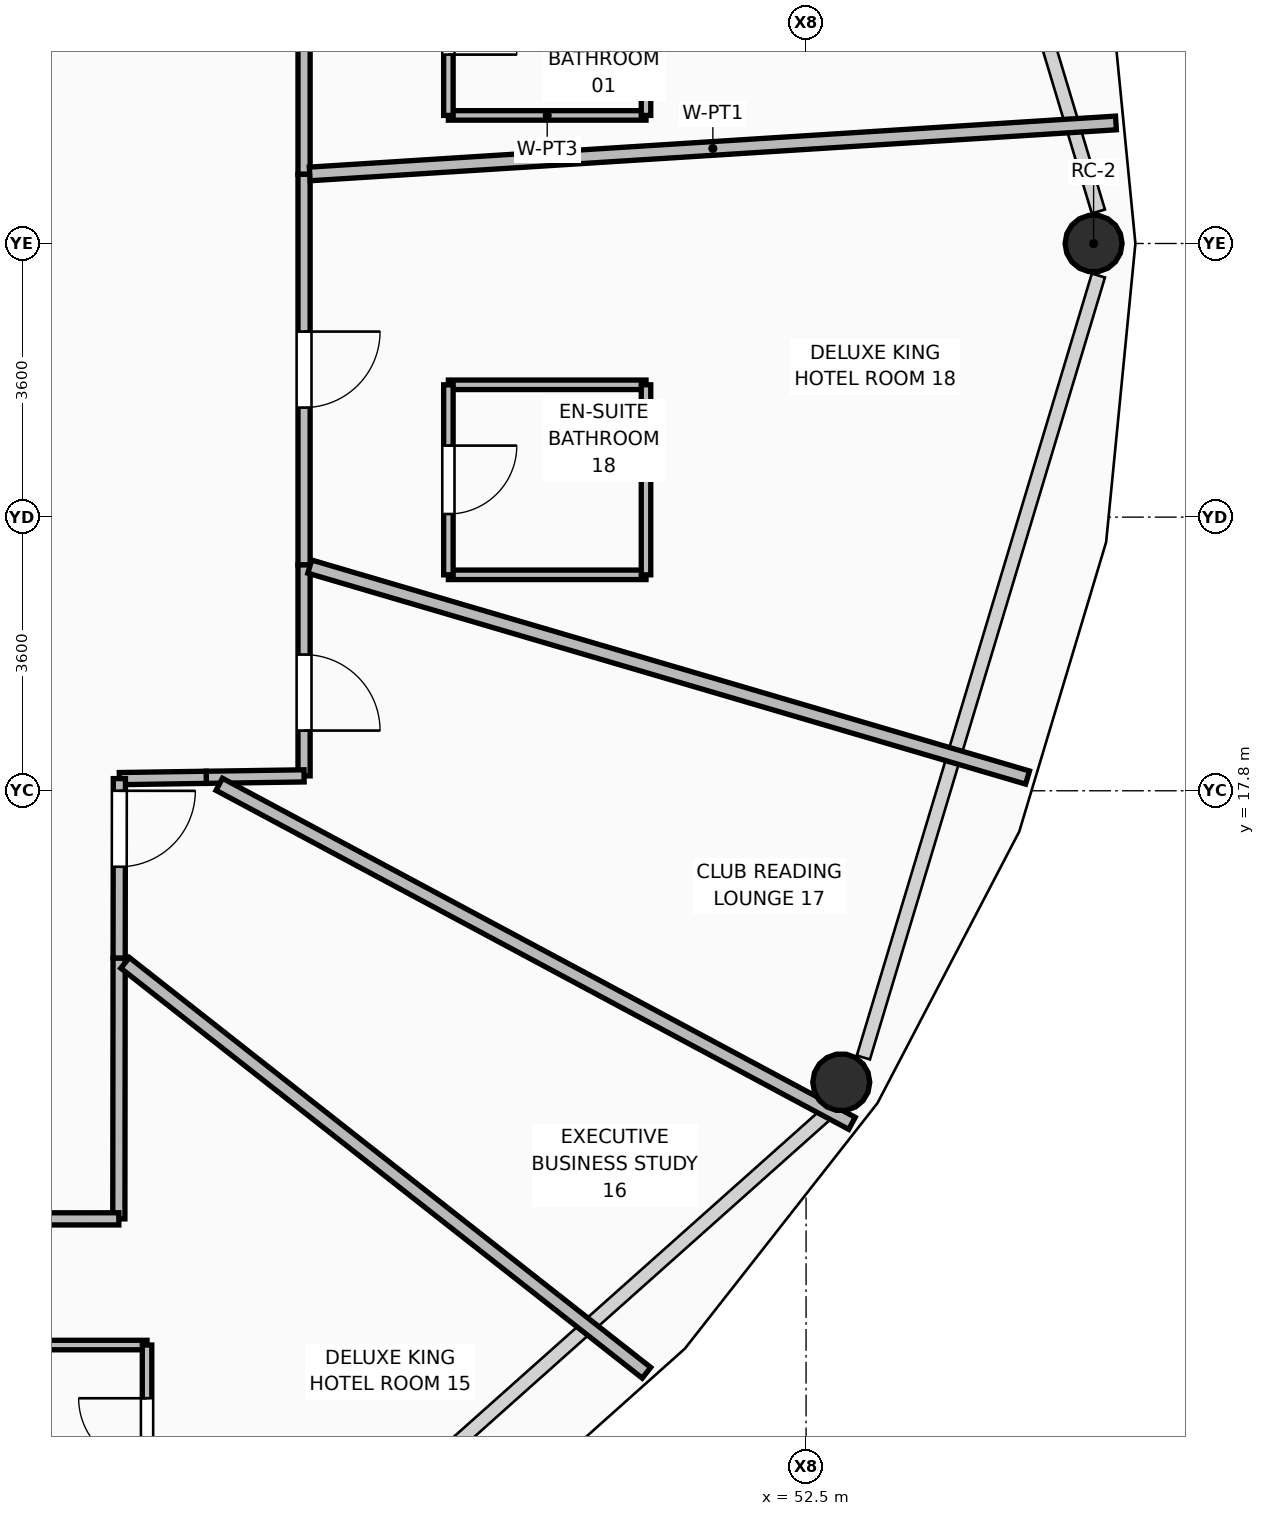
"""IFC4 building model, lengths in metres.
Left out: names, types, materials, properties, quantities, classifications, styles, units other than length and angle.
Written with IfcOpenShell. Run it as: python <this file> out.ifc"""

import sys

from ifc_helpers import new_model, si_unit, direction, frame, frame_2d, origin, origin_2d, place, context, subcontext, project, spatial, rectangle, hollow_circle, extrude, element, fill, save


model = new_model("IFC4")
c1 = context("Model", 3, precision=1e-05, world=origin(), true_north=direction((0.0, 1.0)))
c2 = subcontext(c1, "Body", "Model", "MODEL_VIEW")
j1 = project(units=[si_unit("LENGTHUNIT", "METRE"), si_unit("PLANEANGLEUNIT", "RADIAN")], contexts=[c1])
p1 = place(None, origin())
s1 = spatial("IfcSite", under=j1, at=p1, CompositionType="ELEMENT")
p2 = place(p1, origin())
s2 = spatial("IfcBuilding", under=s1, at=p2, CompositionType="ELEMENT")
p3 = place(p2, frame((0.0, 0.0, 153.45)))
s3 = spatial("IfcBuildingStorey", under=s2, at=p3, CompositionType="ELEMENT", Elevation=153.45)
for number, where, z_axis, x_axis in (
    (1, (56.283, 25.0, 0.0), (0.0, 0.0, 1.0), (1.0, 0.0, 0.0)),
    (2, (52.963, 13.965, 0.0), (0.0, 0.0, 1.0), (1.0, 0.0, 0.0)),
):
    element("IfcColumn", number, at=place(p3, frame(where, z_axis=z_axis, x_axis=x_axis)), inside=s3, PredefinedType="COLUMN", context=c2, shape_type="SweptSolid", body=[
        extrude(hollow_circle(Radius=0.375, WallThickness=0.035, at=origin_2d()), origin(), (0.0, 0.0, 1.0), 3.57),
    ])
p4 = place(p3, frame((45.895, 31.348, 0.0), z_axis=(0.0, 0.0, 1.0), x_axis=(0.0, -1.0, 0.0)))
e3 = element("IfcWall", 3, at=p4, inside=s3, PredefinedType="PARTITIONING", context=c2, shape_type="SweptSolid", body=[
    extrude(rectangle(XDim=5.438, YDim=0.16, at=frame_2d((2.719, 0.0))), origin(), (0.0, 0.0, 1.0), 3.55),
])
p5 = place(p4, frame((2.219, 0.0, 0.0)))
e4 = element("IfcOpeningElement", 4, at=p5, cuts=e3, PredefinedType="OPENING", context=c2, shape_type="SweptSolid", body=[
    extrude(rectangle(XDim=1.0, YDim=2.1, at=frame_2d((0.5, 1.05))), frame((0.0, 0.09, 0.0), z_axis=(0.0, -1.0, 0.0), x_axis=(1.0, 0.0, 0.0)), (0.0, 0.0, 1.0), 0.18),
])
p6 = place(p3, frame((45.895, 25.91, 0.0), z_axis=(0.0, 0.0, 1.0), x_axis=(0.0, -1.0, 0.0)))
e5 = element("IfcWall", 5, at=p6, inside=s3, PredefinedType="PARTITIONING", context=c2, shape_type="SweptSolid", body=[
    extrude(rectangle(XDim=5.139, YDim=0.16, at=frame_2d((2.569, 0.0))), origin(), (0.0, 0.0, 1.0), 3.006),
])
p7 = place(p6, frame((2.069, 0.0, 0.0)))
e6 = element("IfcOpeningElement", 6, at=p7, cuts=e5, PredefinedType="OPENING", context=c2, shape_type="SweptSolid", body=[
    extrude(rectangle(XDim=1.0, YDim=2.1, at=frame_2d((0.5, 1.05))), frame((0.0, 0.09, 0.0), z_axis=(0.0, -1.0, 0.0), x_axis=(1.0, 0.0, 0.0)), (0.0, 0.0, 1.0), 0.18),
])
p8 = place(p3, frame((45.895, 20.771, 0.0), z_axis=(0.0, 0.0, 1.0), x_axis=(0.0, -1.0, 0.0)))
e7 = element("IfcWall", 7, at=p8, inside=s3, PredefinedType="PARTITIONING", context=c2, shape_type="SweptSolid", body=[
    extrude(rectangle(XDim=2.775, YDim=0.16, at=frame_2d((1.387, 0.0))), origin(), (0.0, 0.0, 1.0), 3.55),
])
p9 = place(p8, frame((1.179, 0.0, 0.0)))
e8 = element("IfcOpeningElement", 8, at=p9, cuts=e7, PredefinedType="OPENING", context=c2, shape_type="SweptSolid", body=[
    extrude(rectangle(XDim=1.0, YDim=2.1, at=frame_2d((0.5, 1.05))), frame((0.0, 0.09, 0.0), z_axis=(0.0, -1.0, 0.0), x_axis=(1.0, 0.0, 0.0)), (0.0, 0.0, 1.0), 0.18),
])
p10 = place(p3, frame((45.895, 17.996, 0.0), z_axis=(0.0, 0.0, 1.0), x_axis=(-0.99989056982, -0.014793525123, 0.0)))
e9 = element("IfcWall", 9, at=p10, inside=s3, PredefinedType="PARTITIONING", context=c2, shape_type="SweptSolid", body=[
    extrude(rectangle(XDim=1.287, YDim=0.16, at=frame_2d((0.644, 0.0))), origin(), (0.0, 0.0, 1.0), 3.55),
])
p11 = place(p3, frame((44.608, 17.977, 0.0), z_axis=(0.0, 0.0, 1.0), x_axis=(-0.99988820665, -0.014952397878, 0.0)))
e10 = element("IfcWall", 10, at=p11, inside=s3, PredefinedType="PARTITIONING", context=c2, shape_type="SweptSolid", body=[
    extrude(rectangle(XDim=1.143, YDim=0.16, at=frame_2d((0.572, 0.0))), origin(), (0.0, 0.0, 1.0), 3.55),
])
p12 = place(p3, frame((43.465, 17.96, 0.0), z_axis=(0.0, 0.0, 1.0), x_axis=(-0.001343112747, -0.999999098024, 0.0)))
e11 = element("IfcWall", 11, at=p12, inside=s3, PredefinedType="PARTITIONING", context=c2, shape_type="SweptSolid", body=[
    extrude(rectangle(XDim=2.363, YDim=0.16, at=frame_2d((1.182, 0.0))), origin(), (0.0, 0.0, 1.0), 3.006),
])
p13 = place(p12, frame((0.16, 0.0, 0.0)))
e12 = element("IfcOpeningElement", 12, at=p13, cuts=e11, PredefinedType="OPENING", context=c2, shape_type="SweptSolid", body=[
    extrude(rectangle(XDim=1.0, YDim=2.1, at=frame_2d((0.5, 1.05))), frame((0.0, 0.09, 0.0), z_axis=(0.0, -1.0, 0.0), x_axis=(1.0, 0.0, 0.0)), (0.0, 0.0, 1.0), 0.18),
])
p14 = place(p3, frame((43.462, 15.597, 0.0), z_axis=(0.0, 0.0, 1.0), x_axis=(-0.001139194704, -0.999999351118, 0.0)))
e13 = element("IfcWall", 13, at=p14, inside=s3, PredefinedType="PARTITIONING", context=c2, shape_type="SweptSolid", body=[
    extrude(rectangle(XDim=3.429, YDim=0.16, at=frame_2d((1.714, 0.0))), origin(), (0.0, 0.0, 1.0), 3.55),
])
p15 = place(p3, frame((43.458, 12.168, 0.0), z_axis=(0.0, 0.0, 1.0), x_axis=(-0.999999914606, -0.000413265798, 0.0)))
e14 = element("IfcWall", 14, at=p15, inside=s3, PredefinedType="PARTITIONING", context=c2, shape_type="SweptSolid", body=[
    extrude(rectangle(XDim=4.726, YDim=0.16, at=frame_2d((2.363, 0.0))), origin(), (0.0, 0.0, 1.0), 3.006),
])
p16 = place(p15, frame((2.826, 0.0, 0.0)))
e15 = element("IfcOpeningElement", 15, at=p16, cuts=e14, PredefinedType="OPENING", context=c2, shape_type="SweptSolid", body=[
    extrude(rectangle(XDim=1.0, YDim=2.1, at=frame_2d((0.5, 1.05))), frame((0.0, 0.09, 0.0), z_axis=(0.0, -1.0, 0.0), x_axis=(1.0, 0.0, 0.0)), (0.0, 0.0, 1.0), 0.18),
])
p17 = place(p3, frame((45.97, 25.915, 0.0), z_axis=(0.0, 0.0, 1.0), x_axis=(0.998005641889, 0.063124787182, 0.0)))
e16 = element("IfcWall", 16, at=p17, inside=s3, PredefinedType="PARTITIONING", context=c2, shape_type="SweptSolid", body=[
    extrude(rectangle(XDim=10.628, YDim=0.18, at=frame_2d((5.314, 0.0))), origin(), (0.0, 0.0, 1.0), 2.852),
])
p18 = place(p3, frame((38.783, 12.075, 0.0), z_axis=(0.0, 0.0, 1.0), x_axis=(0.490941390618, -0.871192602688, 0.0)))
e17 = element("IfcWall", 17, at=p18, inside=s3, PredefinedType="PARTITIONING", context=c2, shape_type="SweptSolid", body=[
    extrude(rectangle(XDim=8.178, YDim=0.18, at=frame_2d((4.089, 0.0))), origin(), (0.0, 0.0, 1.0), 2.852),
])
p19 = place(p3, frame((43.54, 15.536, 0.0), z_axis=(0.0, 0.0, 1.0), x_axis=(0.786155203297, -0.618029122558, 0.0)))
e18 = element("IfcWall", 18, at=p19, inside=s3, PredefinedType="PARTITIONING", context=c2, shape_type="SweptSolid", body=[
    extrude(rectangle(XDim=8.726, YDim=0.18, at=frame_2d((4.363, 0.0))), origin(), (0.0, 0.0, 1.0), 2.852),
])
p20 = place(p3, frame((44.779, 17.885, 0.0), z_axis=(0.0, 0.0, 1.0), x_axis=(0.881472668275, -0.472235042202, 0.0)))
e19 = element("IfcWall", 19, at=p20, inside=s3, PredefinedType="PARTITIONING", context=c2, shape_type="SweptSolid", body=[
    extrude(rectangle(XDim=9.444, YDim=0.18, at=frame_2d((4.722, 0.0))), origin(), (0.0, 0.0, 1.0), 2.852),
])
p21 = place(p3, frame((45.97, 20.749, 0.0), z_axis=(0.0, 0.0, 1.0), x_axis=(0.959441691332, -0.281907149489, 0.0)))
e20 = element("IfcWall", 20, at=p21, inside=s3, PredefinedType="PARTITIONING", context=c2, shape_type="SweptSolid", body=[
    extrude(rectangle(XDim=9.843, YDim=0.18, at=frame_2d((4.922, 0.0))), origin(), (0.0, 0.0, 1.0), 2.852),
])
p22 = place(p3, frame((47.794, 26.685, 0.0), z_axis=(0.0, 0.0, 1.0), x_axis=(1.0, 0.0, 0.0)))
e21 = element("IfcWall", 21, at=p22, inside=s3, PredefinedType="PARTITIONING", context=c2, shape_type="SweptSolid", body=[
    extrude(rectangle(XDim=2.6, YDim=0.125, at=frame_2d((1.3, 0.0))), origin(), (0.0, 0.0, 1.0), 3.55),
])
p23 = place(p3, frame((47.794, 26.685, 0.0), z_axis=(0.0, 0.0, 1.0), x_axis=(0.0, 1.0, 0.0)))
e22 = element("IfcWall", 22, at=p23, inside=s3, PredefinedType="PARTITIONING", context=c2, shape_type="SweptSolid", body=[
    extrude(rectangle(XDim=2.5, YDim=0.125, at=frame_2d((1.25, 0.0))), origin(), (0.0, 0.0, 1.0), 3.55),
])
p24 = place(p23, frame((0.8, 0.0, 0.0)))
e23 = element("IfcOpeningElement", 23, at=p24, cuts=e22, PredefinedType="OPENING", context=c2, shape_type="SweptSolid", body=[
    extrude(rectangle(XDim=0.9, YDim=2.1, at=frame_2d((0.45, 1.05))), frame((0.0, 0.073, 0.0), z_axis=(0.0, -1.0, 0.0), x_axis=(1.0, 0.0, 0.0)), (0.0, 0.0, 1.0), 0.145),
])
p25 = place(p3, frame((50.394, 26.685, 0.0), z_axis=(0.0, 0.0, 1.0), x_axis=(0.0, 1.0, 0.0)))
e24 = element("IfcWall", 24, at=p25, inside=s3, PredefinedType="PARTITIONING", context=c2, shape_type="SweptSolid", body=[
    extrude(rectangle(XDim=2.5, YDim=0.125, at=frame_2d((1.25, 0.0))), origin(), (0.0, 0.0, 1.0), 3.55),
])
p26 = place(p3, frame((41.479, 10.508, 0.0), z_axis=(0.0, 0.0, 1.0), x_axis=(1.0, 0.0, 0.0)))
e25 = element("IfcWall", 25, at=p26, inside=s3, PredefinedType="PARTITIONING", context=c2, shape_type="SweptSolid", body=[
    extrude(rectangle(XDim=2.35, YDim=0.125, at=frame_2d((1.175, 0.0))), origin(), (0.0, 0.0, 1.0), 3.006),
])
p27 = place(p3, frame((43.829, 8.208, 0.0), z_axis=(0.0, 0.0, 1.0), x_axis=(0.0, 1.0, 0.0)))
e26 = element("IfcWall", 26, at=p27, inside=s3, PredefinedType="PARTITIONING", context=c2, shape_type="SweptSolid", body=[
    extrude(rectangle(XDim=2.3, YDim=0.125, at=frame_2d((1.15, 0.0))), origin(), (0.0, 0.0, 1.0), 3.55),
])
p28 = place(p27, frame((0.7, 0.0, 0.0)))
e27 = element("IfcOpeningElement", 27, at=p28, cuts=e26, PredefinedType="OPENING", context=c2, shape_type="SweptSolid", body=[
    extrude(rectangle(XDim=0.9, YDim=2.1, at=frame_2d((0.45, 1.05))), frame((0.0, 0.073, 0.0), z_axis=(0.0, -1.0, 0.0), x_axis=(1.0, 0.0, 0.0)), (0.0, 0.0, 1.0), 0.145),
])
p29 = place(p3, frame((47.794, 20.641, 0.0), z_axis=(0.0, 0.0, 1.0), x_axis=(1.0, 0.0, 0.0)))
e28 = element("IfcWall", 28, at=p29, inside=s3, PredefinedType="PARTITIONING", context=c2, shape_type="SweptSolid", body=[
    extrude(rectangle(XDim=2.6, YDim=0.125, at=frame_2d((1.3, 0.0))), origin(), (0.0, 0.0, 1.0), 3.55),
])
p30 = place(p3, frame((47.794, 23.141, 0.0), z_axis=(0.0, 0.0, 1.0), x_axis=(1.0, 0.0, 0.0)))
e29 = element("IfcWall", 29, at=p30, inside=s3, PredefinedType="PARTITIONING", context=c2, shape_type="SweptSolid", body=[
    extrude(rectangle(XDim=2.6, YDim=0.125, at=frame_2d((1.3, 0.0))), origin(), (0.0, 0.0, 1.0), 3.006),
])
p31 = place(p3, frame((47.794, 20.641, 0.0), z_axis=(0.0, 0.0, 1.0), x_axis=(0.0, 1.0, 0.0)))
e30 = element("IfcWall", 30, at=p31, inside=s3, PredefinedType="PARTITIONING", context=c2, shape_type="SweptSolid", body=[
    extrude(rectangle(XDim=2.5, YDim=0.125, at=frame_2d((1.25, 0.0))), origin(), (0.0, 0.0, 1.0), 3.006),
])
p32 = place(p31, frame((0.8, 0.0, 0.0)))
e31 = element("IfcOpeningElement", 31, at=p32, cuts=e30, PredefinedType="OPENING", context=c2, shape_type="SweptSolid", body=[
    extrude(rectangle(XDim=0.9, YDim=2.1, at=frame_2d((0.45, 1.05))), frame((0.0, 0.073, 0.0), z_axis=(0.0, -1.0, 0.0), x_axis=(1.0, 0.0, 0.0)), (0.0, 0.0, 1.0), 0.145),
])
p33 = place(p3, frame((50.394, 20.641, 0.0), z_axis=(0.0, 0.0, 1.0), x_axis=(0.0, 1.0, 0.0)))
e32 = element("IfcWall", 32, at=p33, inside=s3, PredefinedType="PARTITIONING", context=c2, shape_type="SweptSolid", body=[
    extrude(rectangle(XDim=2.5, YDim=0.125, at=frame_2d((1.25, 0.0))), origin(), (0.0, 0.0, 1.0), 3.006),
])
p34 = place(p24, frame((0.9, 0.0, 0.0), z_axis=(0.0, 0.0, 1.0), x_axis=(-1.0, 0.0, 0.0)))
e33 = element("IfcDoor", 33, at=p34, inside=s3, OperationType="SINGLE_SWING_RIGHT", PredefinedType="DOOR", context=c2, shape_type="SweptSolid", body=[
    extrude(rectangle(XDim=0.9, YDim=2.1, at=frame_2d((0.45, 1.05))), frame((0.0, 0.025, 0.0), z_axis=(0.0, -1.0, 0.0), x_axis=(1.0, 0.0, 0.0)), (0.0, 0.0, 1.0), 0.05),
])
fill(e23, e33)
p35 = place(p28, origin())
e34 = element("IfcDoor", 34, at=p35, inside=s3, OperationType="SINGLE_SWING_RIGHT", PredefinedType="DOOR", context=c2, shape_type="SweptSolid", body=[
    extrude(rectangle(XDim=0.9, YDim=2.1, at=frame_2d((0.45, 1.05))), frame((0.0, 0.025, 0.0), z_axis=(0.0, -1.0, 0.0), x_axis=(1.0, 0.0, 0.0)), (0.0, 0.0, 1.0), 0.05),
])
fill(e27, e34)
p36 = place(p13, origin())
e35 = element("IfcDoor", 35, at=p36, inside=s3, OperationType="SINGLE_SWING_LEFT", PredefinedType="DOOR", context=c2, shape_type="SweptSolid", body=[
    extrude(rectangle(XDim=1.0, YDim=2.1, at=frame_2d((0.5, 1.05))), frame((0.0, 0.025, 0.0), z_axis=(0.0, -1.0, 0.0), x_axis=(1.0, 0.0, 0.0)), (0.0, 0.0, 1.0), 0.05),
])
fill(e12, e35)
p37 = place(p9, origin())
e36 = element("IfcDoor", 36, at=p37, inside=s3, OperationType="SINGLE_SWING_RIGHT", PredefinedType="DOOR", context=c2, shape_type="SweptSolid", body=[
    extrude(rectangle(XDim=1.0, YDim=2.1, at=frame_2d((0.5, 1.05))), frame((0.0, 0.025, 0.0), z_axis=(0.0, -1.0, 0.0), x_axis=(1.0, 0.0, 0.0)), (0.0, 0.0, 1.0), 0.05),
])
fill(e8, e36)
p38 = place(p32, frame((0.9, 0.0, 0.0), z_axis=(0.0, 0.0, 1.0), x_axis=(-1.0, 0.0, 0.0)))
e37 = element("IfcDoor", 37, at=p38, inside=s3, OperationType="SINGLE_SWING_LEFT", PredefinedType="DOOR", context=c2, shape_type="SweptSolid", body=[
    extrude(rectangle(XDim=0.9, YDim=2.1, at=frame_2d((0.45, 1.05))), frame((0.0, 0.025, 0.0), z_axis=(0.0, -1.0, 0.0), x_axis=(1.0, 0.0, 0.0)), (0.0, 0.0, 1.0), 0.05),
])
fill(e31, e37)
p39 = place(p7, origin())
e38 = element("IfcDoor", 38, at=p39, inside=s3, OperationType="SINGLE_SWING_LEFT", PredefinedType="DOOR", context=c2, shape_type="SweptSolid", body=[
    extrude(rectangle(XDim=1.0, YDim=2.1, at=frame_2d((0.5, 1.05))), frame((0.0, 0.025, 0.0), z_axis=(0.0, -1.0, 0.0), x_axis=(1.0, 0.0, 0.0)), (0.0, 0.0, 1.0), 0.05),
])
fill(e6, e38)
save(model, sys.argv[1])
